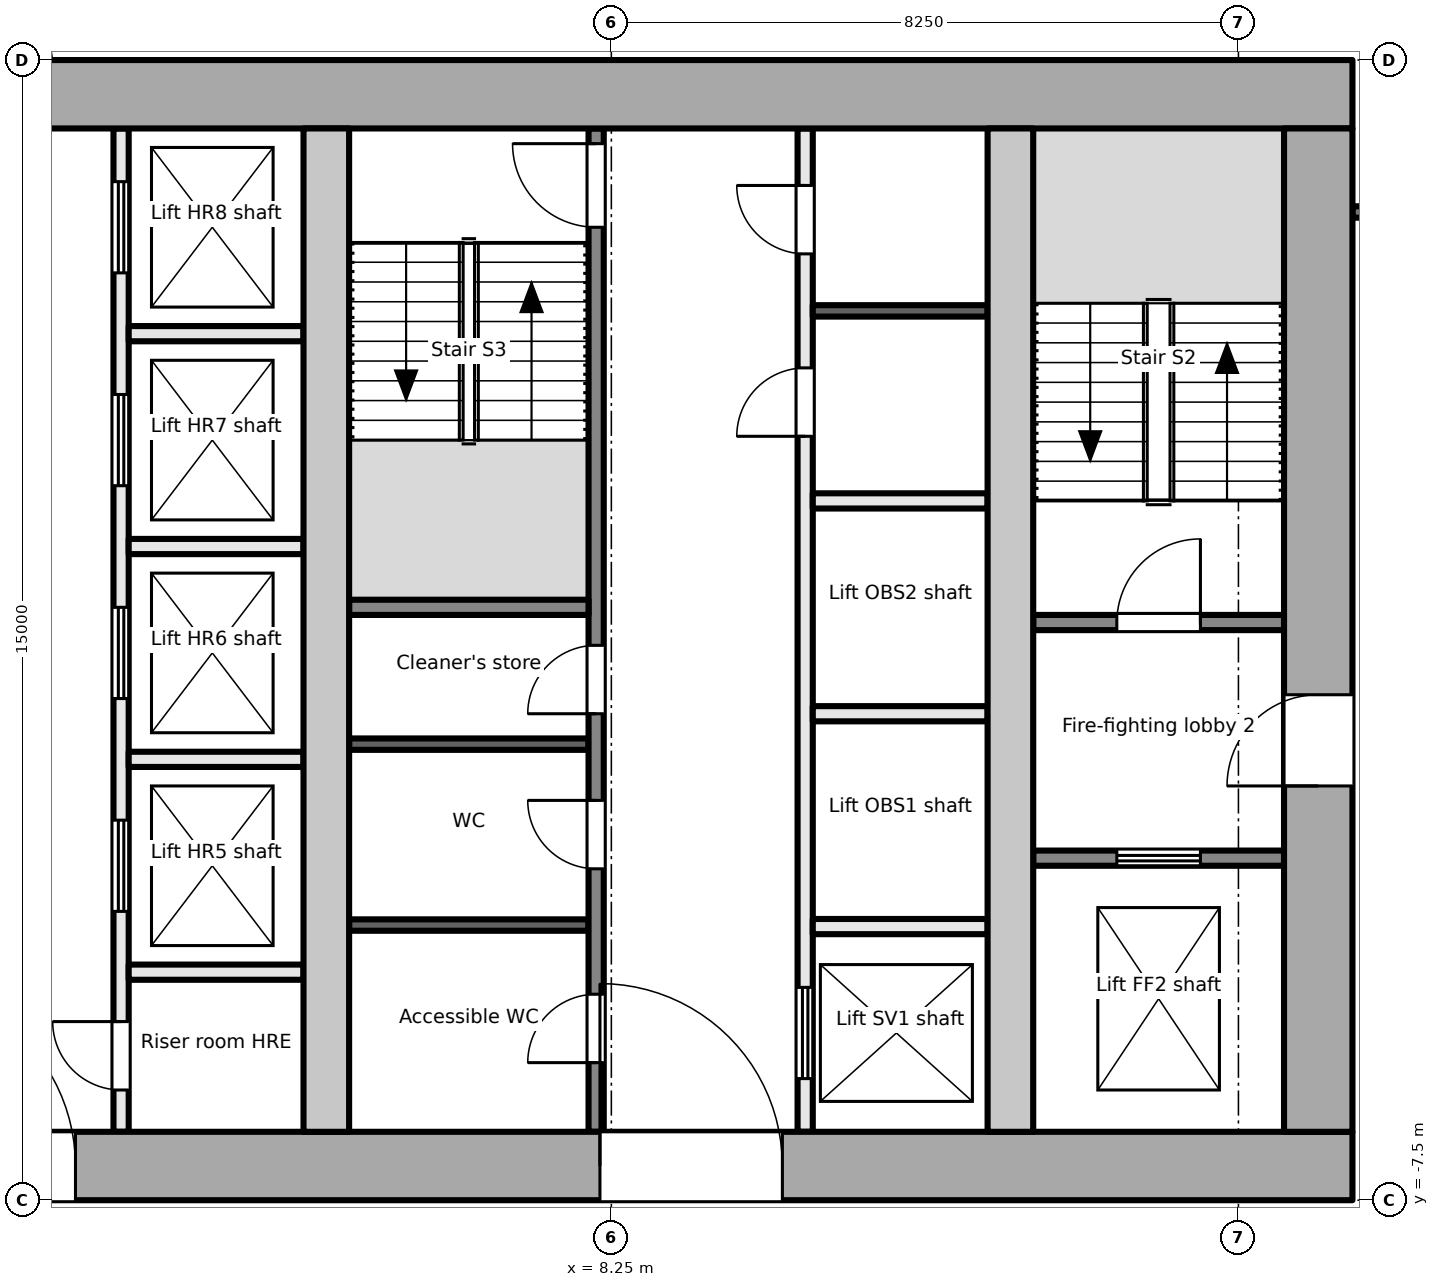
"""IFC4 building model, lengths in metres.
Left out: names, types, materials, properties, quantities, classifications, styles, units other than length and angle.
Written with IfcOpenShell. Run it as: python <this file> out.ifc"""

import sys

from ifc_helpers import new_model, si_unit, direction, frame, frame_2d, origin, place, context, subcontext, project, spatial, rectangle, extrude, element, fill, save


model = new_model("IFC4")
c1 = context("Model", 3, precision=1e-05, world=origin(), true_north=direction((0.0, 1.0)))
c2 = subcontext(c1, "Body", "Model", "MODEL_VIEW")
j1 = project(units=[si_unit("LENGTHUNIT", "METRE"), si_unit("PLANEANGLEUNIT", "RADIAN")], contexts=[c1])
p1 = place(None, origin())
s1 = spatial("IfcSite", under=j1, at=p1, CompositionType="ELEMENT")
p2 = place(p1, origin())
s2 = spatial("IfcBuilding", under=s1, at=p2, CompositionType="ELEMENT")
p3 = place(p2, frame((0.0, 0.0, 168.5)))
s3 = spatial("IfcBuildingStorey", under=s2, at=p3, CompositionType="ELEMENT", Elevation=168.5)
p4 = place(p3, frame((-18.0, -7.05, -0.2), z_axis=(0.0, 0.0, 1.0), x_axis=(1.0, 0.0, 0.0)))
e1 = element("IfcWall", 1, at=p4, inside=s3, PredefinedType="SHEAR", context=c2, shape_type="SweptSolid", body=[
    extrude(rectangle(XDim=36.0, YDim=0.9, at=frame_2d((18.0, 0.0))), origin(), (0.0, 0.0, 1.0), 3.9),
])
p5 = place(p4, frame((8.1, 0.0, 0.2)))
e2 = element("IfcOpeningElement", 2, at=p5, cuts=e1, PredefinedType="OPENING", context=c2, shape_type="SweptSolid", body=[
    extrude(rectangle(XDim=1.8, YDim=2.1, at=frame_2d((0.9, 1.05))), frame((0.0, 0.46, 0.0), z_axis=(0.0, -1.0, 0.0), x_axis=(1.0, 0.0, 0.0)), (0.0, 0.0, 1.0), 0.921),
])
p6 = place(p4, frame((16.8, 0.0, 0.2)))
e3 = element("IfcOpeningElement", 3, at=p6, cuts=e1, PredefinedType="OPENING", context=c2, shape_type="SweptSolid", body=[
    extrude(rectangle(XDim=2.4, YDim=2.1, at=frame_2d((1.2, 1.05))), frame((0.0, 0.46, 0.0), z_axis=(0.0, -1.0, 0.0), x_axis=(1.0, 0.0, 0.0)), (0.0, 0.0, 1.0), 0.921),
])
p7 = place(p4, frame((26.1, 0.0, 0.2)))
e4 = element("IfcOpeningElement", 4, at=p7, cuts=e1, PredefinedType="OPENING", context=c2, shape_type="SweptSolid", body=[
    extrude(rectangle(XDim=2.4, YDim=2.1, at=frame_2d((1.2, 1.05))), frame((0.0, 0.46, 0.0), z_axis=(0.0, -1.0, 0.0), x_axis=(1.0, 0.0, 0.0)), (0.0, 0.0, 1.0), 0.921),
])
p8 = place(p3, frame((-18.0, 7.05, -0.2), z_axis=(0.0, 0.0, 1.0), x_axis=(1.0, 0.0, 0.0)))
e5 = element("IfcWall", 5, at=p8, inside=s3, PredefinedType="SHEAR", context=c2, shape_type="SweptSolid", body=[
    extrude(rectangle(XDim=36.0, YDim=0.9, at=frame_2d((18.0, 0.0))), origin(), (0.0, 0.0, 1.0), 3.9),
])
p9 = place(p3, frame((17.55, -6.6, -0.2), z_axis=(0.0, 0.0, 1.0), x_axis=(0.0, 1.0, 0.0)))
e6 = element("IfcWall", 6, at=p9, inside=s3, PredefinedType="SHEAR", context=c2, shape_type="SweptSolid", body=[
    extrude(rectangle(XDim=13.2, YDim=0.9, at=frame_2d((6.6, 0.0))), origin(), (0.0, 0.0, 1.0), 3.9),
])
p10 = place(p9, frame((4.55, 0.0, 0.2)))
e7 = element("IfcOpeningElement", 7, at=p10, cuts=e6, PredefinedType="OPENING", context=c2, shape_type="SweptSolid", body=[
    extrude(rectangle(XDim=1.2, YDim=2.1, at=frame_2d((0.6, 1.05))), frame((0.0, 0.46, 0.0), z_axis=(0.0, -1.0, 0.0), x_axis=(1.0, 0.0, 0.0)), (0.0, 0.0, 1.0), 0.921),
])
for number, where, z_axis, x_axis in (
    (8, (4.5, -6.6, -0.2), (0.0, 0.0, 1.0), (0.0, 1.0, 0.0)),
    (9, (13.5, -6.6, -0.2), (0.0, 0.0, 1.0), (0.0, 1.0, 0.0)),
):
    element("IfcWall", number, at=place(p3, frame(where, z_axis=z_axis, x_axis=x_axis)), inside=s3, PredefinedType="SHEAR", context=c2, shape_type="SweptSolid", body=[
        extrude(rectangle(XDim=13.2, YDim=0.6, at=frame_2d((6.6, 0.0))), origin(), (0.0, 0.0, 1.0), 3.9),
    ])
p11 = place(p3, frame((13.8, -3.0, 0.0), z_axis=(0.0, 0.0, 1.0), x_axis=(1.0, 0.0, 0.0)))
e10 = element("IfcWall", 10, at=p11, inside=s3, PredefinedType="PARTITIONING", context=c2, shape_type="SweptSolid", body=[
    extrude(rectangle(XDim=3.3, YDim=0.2, at=frame_2d((1.65, 0.0))), origin(), (0.0, 0.0, 1.0), 3.7),
])
p12 = place(p11, frame((1.1, 0.0, 0.0)))
e11 = element("IfcOpeningElement", 11, at=p12, cuts=e10, PredefinedType="OPENING", context=c2, shape_type="SweptSolid", body=[
    extrude(rectangle(XDim=1.1, YDim=2.1, at=frame_2d((0.55, 1.05))), frame((0.0, 0.111, 0.0), z_axis=(0.0, -1.0, 0.0), x_axis=(1.0, 0.0, 0.0)), (0.0, 0.0, 1.0), 0.221),
])
p13 = place(p3, frame((13.8, 0.1, 0.0), z_axis=(0.0, 0.0, 1.0), x_axis=(1.0, 0.0, 0.0)))
e12 = element("IfcWall", 12, at=p13, inside=s3, PredefinedType="PARTITIONING", context=c2, shape_type="SweptSolid", body=[
    extrude(rectangle(XDim=3.3, YDim=0.2, at=frame_2d((1.65, 0.0))), origin(), (0.0, 0.0, 1.0), 3.7),
])
p14 = place(p13, frame((1.1, 0.0, 0.0)))
e13 = element("IfcOpeningElement", 13, at=p14, cuts=e12, PredefinedType="OPENING", context=c2, shape_type="SweptSolid", body=[
    extrude(rectangle(XDim=1.1, YDim=2.1, at=frame_2d((0.55, 1.05))), frame((0.0, 0.111, 0.0), z_axis=(0.0, -1.0, 0.0), x_axis=(1.0, 0.0, 0.0)), (0.0, 0.0, 1.0), 0.221),
])
p15 = place(p3, frame((1.8, -6.6, 0.0), z_axis=(0.0, 0.0, 1.0), x_axis=(0.0, 1.0, 0.0)))
e14 = element("IfcWall", 14, at=p15, inside=s3, PredefinedType="PARTITIONING", context=c2, shape_type="SweptSolid", body=[
    extrude(rectangle(XDim=13.2, YDim=0.2, at=frame_2d((6.6, 0.0))), origin(), (0.0, 0.0, 1.0), 3.7),
])
p16 = place(p15, frame((0.55, 0.0, 0.0)))
e15 = element("IfcOpeningElement", 15, at=p16, cuts=e14, PredefinedType="OPENING", context=c2, shape_type="SweptSolid", body=[
    extrude(rectangle(XDim=0.9, YDim=2.1, at=frame_2d((0.45, 1.05))), frame((0.0, 0.111, 0.0), z_axis=(0.0, -1.0, 0.0), x_axis=(1.0, 0.0, 0.0)), (0.0, 0.0, 1.0), 0.221),
])
p17 = place(p15, frame((2.9, 0.0, 0.0)))
e16 = element("IfcOpeningElement", 16, at=p17, cuts=e14, PredefinedType="OPENING", context=c2, shape_type="SweptSolid", body=[
    extrude(rectangle(XDim=1.2, YDim=2.1, at=frame_2d((0.6, 1.05))), frame((0.0, 0.111, 0.0), z_axis=(0.0, -1.0, 0.0), x_axis=(1.0, 0.0, 0.0)), (0.0, 0.0, 1.0), 0.221),
])
p18 = place(p15, frame((5.7, 0.0, 0.0)))
e17 = element("IfcOpeningElement", 17, at=p18, cuts=e14, PredefinedType="OPENING", context=c2, shape_type="SweptSolid", body=[
    extrude(rectangle(XDim=1.2, YDim=2.1, at=frame_2d((0.6, 1.05))), frame((0.0, 0.111, 0.0), z_axis=(0.0, -1.0, 0.0), x_axis=(1.0, 0.0, 0.0)), (0.0, 0.0, 1.0), 0.221),
])
p19 = place(p15, frame((8.5, 0.0, 0.0)))
e18 = element("IfcOpeningElement", 18, at=p19, cuts=e14, PredefinedType="OPENING", context=c2, shape_type="SweptSolid", body=[
    extrude(rectangle(XDim=1.2, YDim=2.1, at=frame_2d((0.6, 1.05))), frame((0.0, 0.111, 0.0), z_axis=(0.0, -1.0, 0.0), x_axis=(1.0, 0.0, 0.0)), (0.0, 0.0, 1.0), 0.221),
])
p20 = place(p15, frame((11.3, 0.0, 0.0)))
e19 = element("IfcOpeningElement", 19, at=p20, cuts=e14, PredefinedType="OPENING", context=c2, shape_type="SweptSolid", body=[
    extrude(rectangle(XDim=1.2, YDim=2.1, at=frame_2d((0.6, 1.05))), frame((0.0, 0.111, 0.0), z_axis=(0.0, -1.0, 0.0), x_axis=(1.0, 0.0, 0.0)), (0.0, 0.0, 1.0), 0.221),
])
for number, where, z_axis, x_axis in (
    (20, (1.9, -1.7, 0.0), (0.0, 0.0, 1.0), (1.0, 0.0, 0.0)),
    (21, (1.9, 1.1, 0.0), (0.0, 0.0, 1.0), (1.0, 0.0, 0.0)),
    (22, (1.9, 3.9, 0.0), (0.0, 0.0, 1.0), (1.0, 0.0, 0.0)),
    (23, (1.9, -4.5, 0.0), (0.0, 0.0, 1.0), (1.0, 0.0, 0.0)),
):
    element("IfcWall", number, at=place(p3, frame(where, z_axis=z_axis, x_axis=x_axis)), inside=s3, PredefinedType="PARTITIONING", context=c2, shape_type="SweptSolid", body=[
        extrude(rectangle(XDim=2.3, YDim=0.2, at=frame_2d((1.15, 0.0))), origin(), (0.0, 0.0, 1.0), 3.7),
    ])
p21 = place(p3, frame((8.05, -6.6, 0.0), z_axis=(0.0, 0.0, 1.0), x_axis=(0.0, 1.0, 0.0)))
e24 = element("IfcWall", 24, at=p21, inside=s3, PredefinedType="PARTITIONING", context=c2, shape_type="SweptSolid", body=[
    extrude(rectangle(XDim=13.2, YDim=0.2, at=frame_2d((6.6, 0.0))), origin(), (0.0, 0.0, 1.0), 3.7),
])
p22 = place(p21, frame((0.91, 0.0, 0.0)))
e25 = element("IfcOpeningElement", 25, at=p22, cuts=e24, PredefinedType="OPENING", context=c2, shape_type="SweptSolid", body=[
    extrude(rectangle(XDim=0.9, YDim=2.1, at=frame_2d((0.45, 1.05))), frame((0.0, 0.111, 0.0), z_axis=(0.0, -1.0, 0.0), x_axis=(1.0, 0.0, 0.0)), (0.0, 0.0, 1.0), 0.221),
])
p23 = place(p21, frame((3.46, 0.0, 0.0)))
e26 = element("IfcOpeningElement", 26, at=p23, cuts=e24, PredefinedType="OPENING", context=c2, shape_type="SweptSolid", body=[
    extrude(rectangle(XDim=0.9, YDim=2.1, at=frame_2d((0.45, 1.05))), frame((0.0, 0.111, 0.0), z_axis=(0.0, -1.0, 0.0), x_axis=(1.0, 0.0, 0.0)), (0.0, 0.0, 1.0), 0.221),
])
p24 = place(p21, frame((5.5, 0.0, 0.0)))
e27 = element("IfcOpeningElement", 27, at=p24, cuts=e24, PredefinedType="OPENING", context=c2, shape_type="SweptSolid", body=[
    extrude(rectangle(XDim=0.9, YDim=2.1, at=frame_2d((0.45, 1.05))), frame((0.0, 0.111, 0.0), z_axis=(0.0, -1.0, 0.0), x_axis=(1.0, 0.0, 0.0)), (0.0, 0.0, 1.0), 0.221),
])
p25 = place(p21, frame((11.9, 0.0, 0.0)))
e28 = element("IfcOpeningElement", 28, at=p25, cuts=e24, PredefinedType="OPENING", context=c2, shape_type="SweptSolid", body=[
    extrude(rectangle(XDim=1.1, YDim=2.1, at=frame_2d((0.55, 1.05))), frame((0.0, 0.111, 0.0), z_axis=(0.0, -1.0, 0.0), x_axis=(1.0, 0.0, 0.0)), (0.0, 0.0, 1.0), 0.221),
])
p26 = place(p3, frame((10.8, -6.6, 0.0), z_axis=(0.0, 0.0, 1.0), x_axis=(0.0, 1.0, 0.0)))
e29 = element("IfcWall", 29, at=p26, inside=s3, PredefinedType="PARTITIONING", context=c2, shape_type="SweptSolid", body=[
    extrude(rectangle(XDim=13.2, YDim=0.2, at=frame_2d((6.6, 0.0))), origin(), (0.0, 0.0, 1.0), 3.7),
])
p27 = place(p26, frame((0.7, 0.0, 0.0)))
e30 = element("IfcOpeningElement", 30, at=p27, cuts=e29, PredefinedType="OPENING", context=c2, shape_type="SweptSolid", body=[
    extrude(rectangle(XDim=1.2, YDim=2.1, at=frame_2d((0.6, 1.05))), frame((0.0, 0.111, 0.0), z_axis=(0.0, -1.0, 0.0), x_axis=(1.0, 0.0, 0.0)), (0.0, 0.0, 1.0), 0.221),
])
p28 = place(p26, frame((9.15, 0.0, 0.0)))
e31 = element("IfcOpeningElement", 31, at=p28, cuts=e29, PredefinedType="OPENING", context=c2, shape_type="SweptSolid", body=[
    extrude(rectangle(XDim=0.9, YDim=2.1, at=frame_2d((0.45, 1.05))), frame((0.0, 0.111, 0.0), z_axis=(0.0, -1.0, 0.0), x_axis=(1.0, 0.0, 0.0)), (0.0, 0.0, 1.0), 0.221),
])
p29 = place(p26, frame((11.55, 0.0, 0.0)))
e32 = element("IfcOpeningElement", 32, at=p29, cuts=e29, PredefinedType="OPENING", context=c2, shape_type="SweptSolid", body=[
    extrude(rectangle(XDim=0.9, YDim=2.1, at=frame_2d((0.45, 1.05))), frame((0.0, 0.111, 0.0), z_axis=(0.0, -1.0, 0.0), x_axis=(1.0, 0.0, 0.0)), (0.0, 0.0, 1.0), 0.221),
])
p30 = place(p3, frame((4.8, 0.3, 0.0), z_axis=(0.0, 0.0, 1.0), x_axis=(1.0, 0.0, 0.0)))
e33 = element("IfcWall", 33, at=p30, inside=s3, PredefinedType="PARTITIONING", context=c2, shape_type="SweptSolid", body=[
    extrude(rectangle(XDim=3.15, YDim=0.2, at=frame_2d((1.575, 0.0))), origin(), (0.0, 0.0, 1.0), 3.7),
])
for number, where, z_axis, x_axis in (
    (34, (4.8, -3.88, 0.0), (0.0, 0.0, 1.0), (1.0, 0.0, 0.0)),
    (35, (4.8, -1.5, 0.0), (0.0, 0.0, 1.0), (1.0, 0.0, 0.0)),
):
    element("IfcWall", number, at=place(p3, frame(where, z_axis=z_axis, x_axis=x_axis)), inside=s3, PredefinedType="PARTITIONING", context=c2, shape_type="SweptSolid", body=[
        extrude(rectangle(XDim=3.15, YDim=0.15, at=frame_2d((1.575, 0.0))), origin(), (0.0, 0.0, 1.0), 3.7),
    ])
for number, where, z_axis, x_axis in (
    (36, (10.9, -3.9, 0.0), (0.0, 0.0, 1.0), (1.0, 0.0, 0.0)),
    (37, (10.9, -1.1, 0.0), (0.0, 0.0, 1.0), (1.0, 0.0, 0.0)),
    (38, (10.9, 1.7, 0.0), (0.0, 0.0, 1.0), (1.0, 0.0, 0.0)),
):
    element("IfcWall", number, at=place(p3, frame(where, z_axis=z_axis, x_axis=x_axis)), inside=s3, PredefinedType="PARTITIONING", context=c2, shape_type="SweptSolid", body=[
        extrude(rectangle(XDim=2.3, YDim=0.2, at=frame_2d((1.15, 0.0))), origin(), (0.0, 0.0, 1.0), 3.7),
    ])
p31 = place(p3, frame((10.9, 4.2, 0.0), z_axis=(0.0, 0.0, 1.0), x_axis=(1.0, 0.0, 0.0)))
e39 = element("IfcWall", 39, at=p31, inside=s3, PredefinedType="PARTITIONING", context=c2, shape_type="SweptSolid", body=[
    extrude(rectangle(XDim=2.3, YDim=0.15, at=frame_2d((1.15, 0.0))), origin(), (0.0, 0.0, 1.0), 3.7),
])
p32 = place(p3, frame((18.0, 5.501, 0.0), z_axis=(0.0, 0.0, 1.0), x_axis=(1.0, 0.0, 0.0)))
e40 = element("IfcWall", 40, at=p32, inside=s3, PredefinedType="PARTITIONING", context=c2, shape_type="SweptSolid", body=[
    extrude(rectangle(XDim=2.325, YDim=0.15, at=frame_2d((1.163, 0.0))), origin(), (0.0, 0.0, 1.0), 3.7),
])
p33 = place(p32, frame((0.268, 0.0, 0.0)))
e41 = element("IfcOpeningElement", 41, at=p33, cuts=e40, PredefinedType="OPENING", context=c2, shape_type="SweptSolid", body=[
    extrude(rectangle(XDim=1.8, YDim=2.1, at=frame_2d((0.9, 1.05))), frame((0.0, 0.085, 0.0), z_axis=(0.0, -1.0, 0.0), x_axis=(1.0, 0.0, 0.0)), (0.0, 0.0, 1.0), 0.171),
])
p34 = place(p12, origin())
e42 = element("IfcDoor", 42, at=p34, inside=s3, OperationType="DOUBLE_DOOR_SLIDING", PredefinedType="DOOR", context=c2, shape_type="SweptSolid", body=[
    extrude(rectangle(XDim=1.1, YDim=2.1, at=frame_2d((0.55, 1.05))), frame((0.0, 0.025, 0.0), z_axis=(0.0, -1.0, 0.0), x_axis=(1.0, 0.0, 0.0)), (0.0, 0.0, 1.0), 0.05),
])
fill(e11, e42)
p35 = place(p10, origin())
e43 = element("IfcDoor", 43, at=p35, inside=s3, OperationType="SINGLE_SWING_LEFT", PredefinedType="DOOR", context=c2, shape_type="SweptSolid", body=[
    extrude(rectangle(XDim=1.2, YDim=2.1, at=frame_2d((0.6, 1.05))), frame((0.0, 0.025, 0.0), z_axis=(0.0, -1.0, 0.0), x_axis=(1.0, 0.0, 0.0)), (0.0, 0.0, 1.0), 0.05),
])
fill(e7, e43)
p36 = place(p14, origin())
e44 = element("IfcDoor", 44, at=p36, inside=s3, OperationType="SINGLE_SWING_RIGHT", PredefinedType="DOOR", context=c2, shape_type="SweptSolid", body=[
    extrude(rectangle(XDim=1.1, YDim=2.1, at=frame_2d((0.55, 1.05))), frame((0.0, 0.025, 0.0), z_axis=(0.0, -1.0, 0.0), x_axis=(1.0, 0.0, 0.0)), (0.0, 0.0, 1.0), 0.05),
])
fill(e13, e44)
p37 = place(p16, origin())
e45 = element("IfcDoor", 45, at=p37, inside=s3, OperationType="SINGLE_SWING_RIGHT", PredefinedType="DOOR", context=c2, shape_type="SweptSolid", body=[
    extrude(rectangle(XDim=0.9, YDim=2.1, at=frame_2d((0.45, 1.05))), frame((0.0, 0.025, 0.0), z_axis=(0.0, -1.0, 0.0), x_axis=(1.0, 0.0, 0.0)), (0.0, 0.0, 1.0), 0.05),
])
fill(e15, e45)
p38 = place(p17, origin())
e46 = element("IfcDoor", 46, at=p38, inside=s3, OperationType="DOUBLE_DOOR_SLIDING", PredefinedType="DOOR", context=c2, shape_type="SweptSolid", body=[
    extrude(rectangle(XDim=1.2, YDim=2.1, at=frame_2d((0.6, 1.05))), frame((0.0, 0.025, 0.0), z_axis=(0.0, -1.0, 0.0), x_axis=(1.0, 0.0, 0.0)), (0.0, 0.0, 1.0), 0.05),
])
fill(e16, e46)
p39 = place(p18, origin())
e47 = element("IfcDoor", 47, at=p39, inside=s3, OperationType="DOUBLE_DOOR_SLIDING", PredefinedType="DOOR", context=c2, shape_type="SweptSolid", body=[
    extrude(rectangle(XDim=1.2, YDim=2.1, at=frame_2d((0.6, 1.05))), frame((0.0, 0.025, 0.0), z_axis=(0.0, -1.0, 0.0), x_axis=(1.0, 0.0, 0.0)), (0.0, 0.0, 1.0), 0.05),
])
fill(e17, e47)
p40 = place(p19, origin())
e48 = element("IfcDoor", 48, at=p40, inside=s3, OperationType="DOUBLE_DOOR_SLIDING", PredefinedType="DOOR", context=c2, shape_type="SweptSolid", body=[
    extrude(rectangle(XDim=1.2, YDim=2.1, at=frame_2d((0.6, 1.05))), frame((0.0, 0.025, 0.0), z_axis=(0.0, -1.0, 0.0), x_axis=(1.0, 0.0, 0.0)), (0.0, 0.0, 1.0), 0.05),
])
fill(e18, e48)
p41 = place(p20, origin())
e49 = element("IfcDoor", 49, at=p41, inside=s3, OperationType="DOUBLE_DOOR_SLIDING", PredefinedType="DOOR", context=c2, shape_type="SweptSolid", body=[
    extrude(rectangle(XDim=1.2, YDim=2.1, at=frame_2d((0.6, 1.05))), frame((0.0, 0.025, 0.0), z_axis=(0.0, -1.0, 0.0), x_axis=(1.0, 0.0, 0.0)), (0.0, 0.0, 1.0), 0.05),
])
fill(e19, e49)
p42 = place(p6, origin())
e50 = element("IfcDoor", 50, at=p42, inside=s3, OperationType="DOUBLE_DOOR_DOUBLE_SWING", PredefinedType="DOOR", context=c2, shape_type="SweptSolid", body=[
    extrude(rectangle(XDim=2.4, YDim=2.1, at=frame_2d((1.2, 1.05))), frame((0.0, 0.025, 0.0), z_axis=(0.0, -1.0, 0.0), x_axis=(1.0, 0.0, 0.0)), (0.0, 0.0, 1.0), 0.05),
])
fill(e3, e50)
p43 = place(p22, origin())
e51 = element("IfcDoor", 51, at=p43, inside=s3, OperationType="SINGLE_SWING_LEFT", PredefinedType="DOOR", context=c2, shape_type="SweptSolid", body=[
    extrude(rectangle(XDim=0.9, YDim=2.1, at=frame_2d((0.45, 1.05))), frame((0.0, 0.025, 0.0), z_axis=(0.0, -1.0, 0.0), x_axis=(1.0, 0.0, 0.0)), (0.0, 0.0, 1.0), 0.05),
])
fill(e25, e51)
p44 = place(p23, origin())
e52 = element("IfcDoor", 52, at=p44, inside=s3, OperationType="SINGLE_SWING_RIGHT", PredefinedType="DOOR", context=c2, shape_type="SweptSolid", body=[
    extrude(rectangle(XDim=0.9, YDim=2.1, at=frame_2d((0.45, 1.05))), frame((0.0, 0.025, 0.0), z_axis=(0.0, -1.0, 0.0), x_axis=(1.0, 0.0, 0.0)), (0.0, 0.0, 1.0), 0.05),
])
fill(e26, e52)
p45 = place(p24, origin())
e53 = element("IfcDoor", 53, at=p45, inside=s3, OperationType="SINGLE_SWING_LEFT", PredefinedType="DOOR", context=c2, shape_type="SweptSolid", body=[
    extrude(rectangle(XDim=0.9, YDim=2.1, at=frame_2d((0.45, 1.05))), frame((0.0, 0.025, 0.0), z_axis=(0.0, -1.0, 0.0), x_axis=(1.0, 0.0, 0.0)), (0.0, 0.0, 1.0), 0.05),
])
fill(e27, e53)
p46 = place(p25, origin())
e54 = element("IfcDoor", 54, at=p46, inside=s3, OperationType="SINGLE_SWING_RIGHT", PredefinedType="DOOR", context=c2, shape_type="SweptSolid", body=[
    extrude(rectangle(XDim=1.1, YDim=2.1, at=frame_2d((0.55, 1.05))), frame((0.0, 0.025, 0.0), z_axis=(0.0, -1.0, 0.0), x_axis=(1.0, 0.0, 0.0)), (0.0, 0.0, 1.0), 0.05),
])
fill(e28, e54)
p47 = place(p7, origin())
e55 = element("IfcDoor", 55, at=p47, inside=s3, OperationType="DOUBLE_DOOR_DOUBLE_SWING", PredefinedType="DOOR", context=c2, shape_type="SweptSolid", body=[
    extrude(rectangle(XDim=2.4, YDim=2.1, at=frame_2d((1.2, 1.05))), frame((0.0, 0.025, 0.0), z_axis=(0.0, -1.0, 0.0), x_axis=(1.0, 0.0, 0.0)), (0.0, 0.0, 1.0), 0.05),
])
fill(e4, e55)
p48 = place(p27, origin())
e56 = element("IfcDoor", 56, at=p48, inside=s3, OperationType="DOUBLE_DOOR_SLIDING", PredefinedType="DOOR", context=c2, shape_type="SweptSolid", body=[
    extrude(rectangle(XDim=1.2, YDim=2.1, at=frame_2d((0.6, 1.05))), frame((0.0, 0.025, 0.0), z_axis=(0.0, -1.0, 0.0), x_axis=(1.0, 0.0, 0.0)), (0.0, 0.0, 1.0), 0.05),
])
fill(e30, e56)
p49 = place(p28, origin())
e57 = element("IfcDoor", 57, at=p49, inside=s3, OperationType="SINGLE_SWING_LEFT", PredefinedType="DOOR", context=c2, shape_type="SweptSolid", body=[
    extrude(rectangle(XDim=0.9, YDim=2.1, at=frame_2d((0.45, 1.05))), frame((0.0, 0.025, 0.0), z_axis=(0.0, -1.0, 0.0), x_axis=(1.0, 0.0, 0.0)), (0.0, 0.0, 1.0), 0.05),
])
fill(e31, e57)
p50 = place(p29, origin())
e58 = element("IfcDoor", 58, at=p50, inside=s3, OperationType="SINGLE_SWING_RIGHT", PredefinedType="DOOR", context=c2, shape_type="SweptSolid", body=[
    extrude(rectangle(XDim=0.9, YDim=2.1, at=frame_2d((0.45, 1.05))), frame((0.0, 0.025, 0.0), z_axis=(0.0, -1.0, 0.0), x_axis=(1.0, 0.0, 0.0)), (0.0, 0.0, 1.0), 0.05),
])
fill(e32, e58)
save(model, sys.argv[1])
